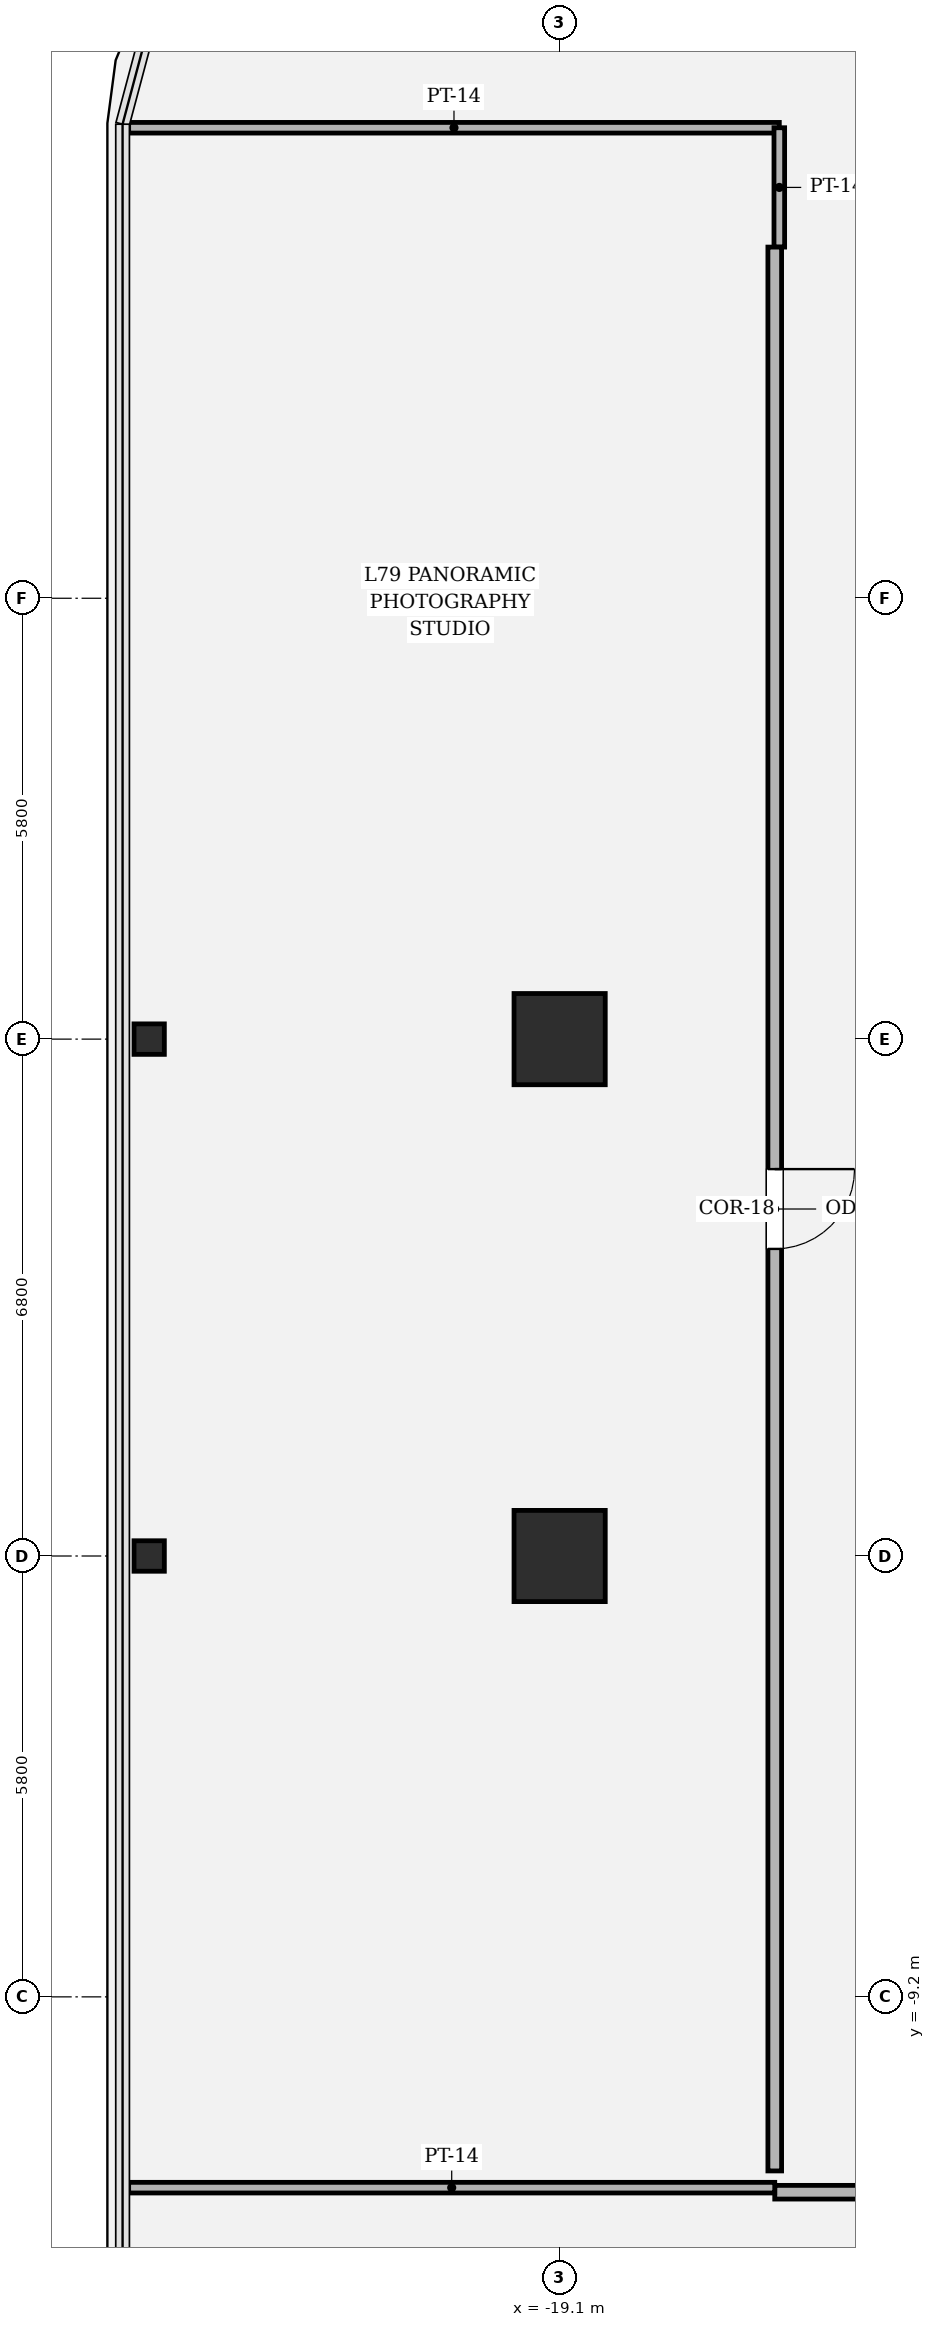
"""IFC4 building model, lengths in metres.
Left out: names, types, materials, properties, quantities, classifications, styles, units other than length and angle.
Written with IfcOpenShell. Run it as: python <this file> out.ifc"""

import sys

from ifc_helpers import new_model, si_unit, direction, frame, frame_2d, origin, origin_2d, place, context, subcontext, project, spatial, rectangle, hollow_rectangle, i_section, extrude, element, fill, save


model = new_model("IFC4")
c1 = context("Model", 3, precision=1e-05, world=origin(), true_north=direction((0.0, 1.0)))
c2 = subcontext(c1, "Body", "Model", "MODEL_VIEW")
j1 = project(units=[si_unit("LENGTHUNIT", "METRE"), si_unit("PLANEANGLEUNIT", "RADIAN")], contexts=[c1])
p1 = place(None, origin())
s1 = spatial("IfcSite", under=j1, at=p1, CompositionType="ELEMENT")
p2 = place(p1, origin())
s2 = spatial("IfcBuilding", under=s1, at=p2, CompositionType="ELEMENT")
p3 = place(p2, frame((0.0, 0.0, 334.2)))
s3 = spatial("IfcBuildingStorey", under=s2, at=p3, CompositionType="ELEMENT", Elevation=334.2)
for number, where, z_axis, x_axis in (
    (1, (-19.1, 3.4, 0.0), (0.0, 0.0, 1.0), (1.0, 0.0, 0.0)),
    (2, (-19.1, -3.4, 0.0), (0.0, 0.0, 1.0), (1.0, 0.0, 0.0)),
):
    element("IfcColumn", number, at=place(p3, frame(where, z_axis=z_axis, x_axis=x_axis)), inside=s3, PredefinedType="COLUMN", context=c2, shape_type="SweptSolid", body=[
        extrude(hollow_rectangle(XDim=1.2, YDim=1.2, WallThickness=0.035, at=origin_2d()), origin(), (0.0, 0.0, 1.0), 4.8),
    ])
for number, where, z_axis, x_axis in (
    (3, (-24.5, -3.4, 0.0), (0.0, 0.0, 1.0), (0.0, 1.0, 0.0)),
    (4, (-24.5, 3.4, 0.0), (0.0, 0.0, 1.0), (0.0, 1.0, 0.0)),
):
    element("IfcColumn", number, at=place(p3, frame(where, z_axis=z_axis, x_axis=x_axis)), inside=s3, PredefinedType="COLUMN", context=c2, shape_type="SweptSolid", body=[
        extrude(i_section(OverallWidth=0.401, OverallDepth=0.399, WebThickness=0.025, FlangeThickness=0.04, FilletRadius=0.018, at=origin_2d()), origin(), (0.0, 0.0, 1.0), 4.798),
    ])
p4 = place(p3, frame((-16.27, -11.77, 0.0), z_axis=(0.0, 0.0, 1.0), x_axis=(1.0, 0.0, 0.0)))
e5 = element("IfcWall", 5, at=p4, inside=s3, PredefinedType="PARTITIONING", context=c2, shape_type="SweptSolid", body=[
    extrude(rectangle(XDim=15.0, YDim=0.18, at=frame_2d((7.5, 0.0))), origin(), (0.0, 0.0, 1.0), 3.214),
])
p5 = place(p4, frame((6.75, 0.0, 0.0)))
e6 = element("IfcOpeningElement", 6, at=p5, cuts=e5, PredefinedType="OPENING", context=c2, shape_type="SweptSolid", body=[
    extrude(rectangle(XDim=1.5, YDim=2.3, at=frame_2d((0.75, 1.15))), frame((0.0, 0.1, 0.0), z_axis=(0.0, -1.0, 0.0), x_axis=(1.0, 0.0, 0.0)), (0.0, 0.0, 1.0), 0.2),
])
p6 = place(p3, frame((-24.77, -11.71, 0.0), z_axis=(0.0, 0.0, 1.0), x_axis=(1.0, 0.0, 0.0)))
e7 = element("IfcWall", 7, at=p6, inside=s3, PredefinedType="PARTITIONING", context=c2, shape_type="SweptSolid", body=[
    extrude(rectangle(XDim=8.5, YDim=0.14, at=frame_2d((4.25, 0.0))), origin(), (0.0, 0.0, 1.0), 3.214),
])
p7 = place(p3, frame((-24.77, 15.39, 0.0), z_axis=(0.0, 0.0, 1.0), x_axis=(1.0, 0.0, 0.0)))
e8 = element("IfcWall", 8, at=p7, inside=s3, PredefinedType="PARTITIONING", context=c2, shape_type="SweptSolid", body=[
    extrude(rectangle(XDim=8.56, YDim=0.14, at=frame_2d((4.28, 0.0))), origin(), (0.0, 0.0, 1.0), 3.214),
])
p8 = place(p3, frame((-16.21, 15.39, 0.0), z_axis=(0.0, 0.0, 1.0), x_axis=(0.0, -1.0, 0.0)))
e9 = element("IfcWall", 9, at=p8, inside=s3, PredefinedType="PARTITIONING", context=c2, shape_type="SweptSolid", body=[
    extrude(rectangle(XDim=1.57, YDim=0.14, at=frame_2d((0.785, 0.0))), origin(), (0.0, 0.0, 1.0), 4.54),
])
p9 = place(p3, frame((-16.27, 13.82, 0.0), z_axis=(0.0, 0.0, 1.0), x_axis=(0.0, -1.0, 0.0)))
e10 = element("IfcWall", 10, at=p9, inside=s3, PredefinedType="PARTITIONING", context=c2, shape_type="SweptSolid", body=[
    extrude(rectangle(XDim=25.31, YDim=0.18, at=frame_2d((12.655, 0.0))), origin(), (0.0, 0.0, 1.0), 3.214),
])
p10 = place(p9, frame((12.13, 0.0, 0.0)))
e11 = element("IfcOpeningElement", 11, at=p10, cuts=e10, PredefinedType="OPENING", context=c2, shape_type="SweptSolid", body=[
    extrude(rectangle(XDim=1.05, YDim=2.2, at=frame_2d((0.525, 1.1))), frame((0.0, 0.1, 0.0), z_axis=(0.0, -1.0, 0.0), x_axis=(1.0, 0.0, 0.0)), (0.0, 0.0, 1.0), 0.2),
])
p11 = place(p10, origin())
e12 = element("IfcDoor", 12, at=p11, inside=s3, OperationType="SINGLE_SWING_LEFT", PredefinedType="DOOR", context=c2, shape_type="SweptSolid", body=[
    extrude(rectangle(XDim=1.05, YDim=2.2, at=frame_2d((0.525, 1.1))), frame((0.0, 0.025, 0.0), z_axis=(0.0, -1.0, 0.0), x_axis=(1.0, 0.0, 0.0)), (0.0, 0.0, 1.0), 0.05),
])
fill(e11, e12)
save(model, sys.argv[1])
